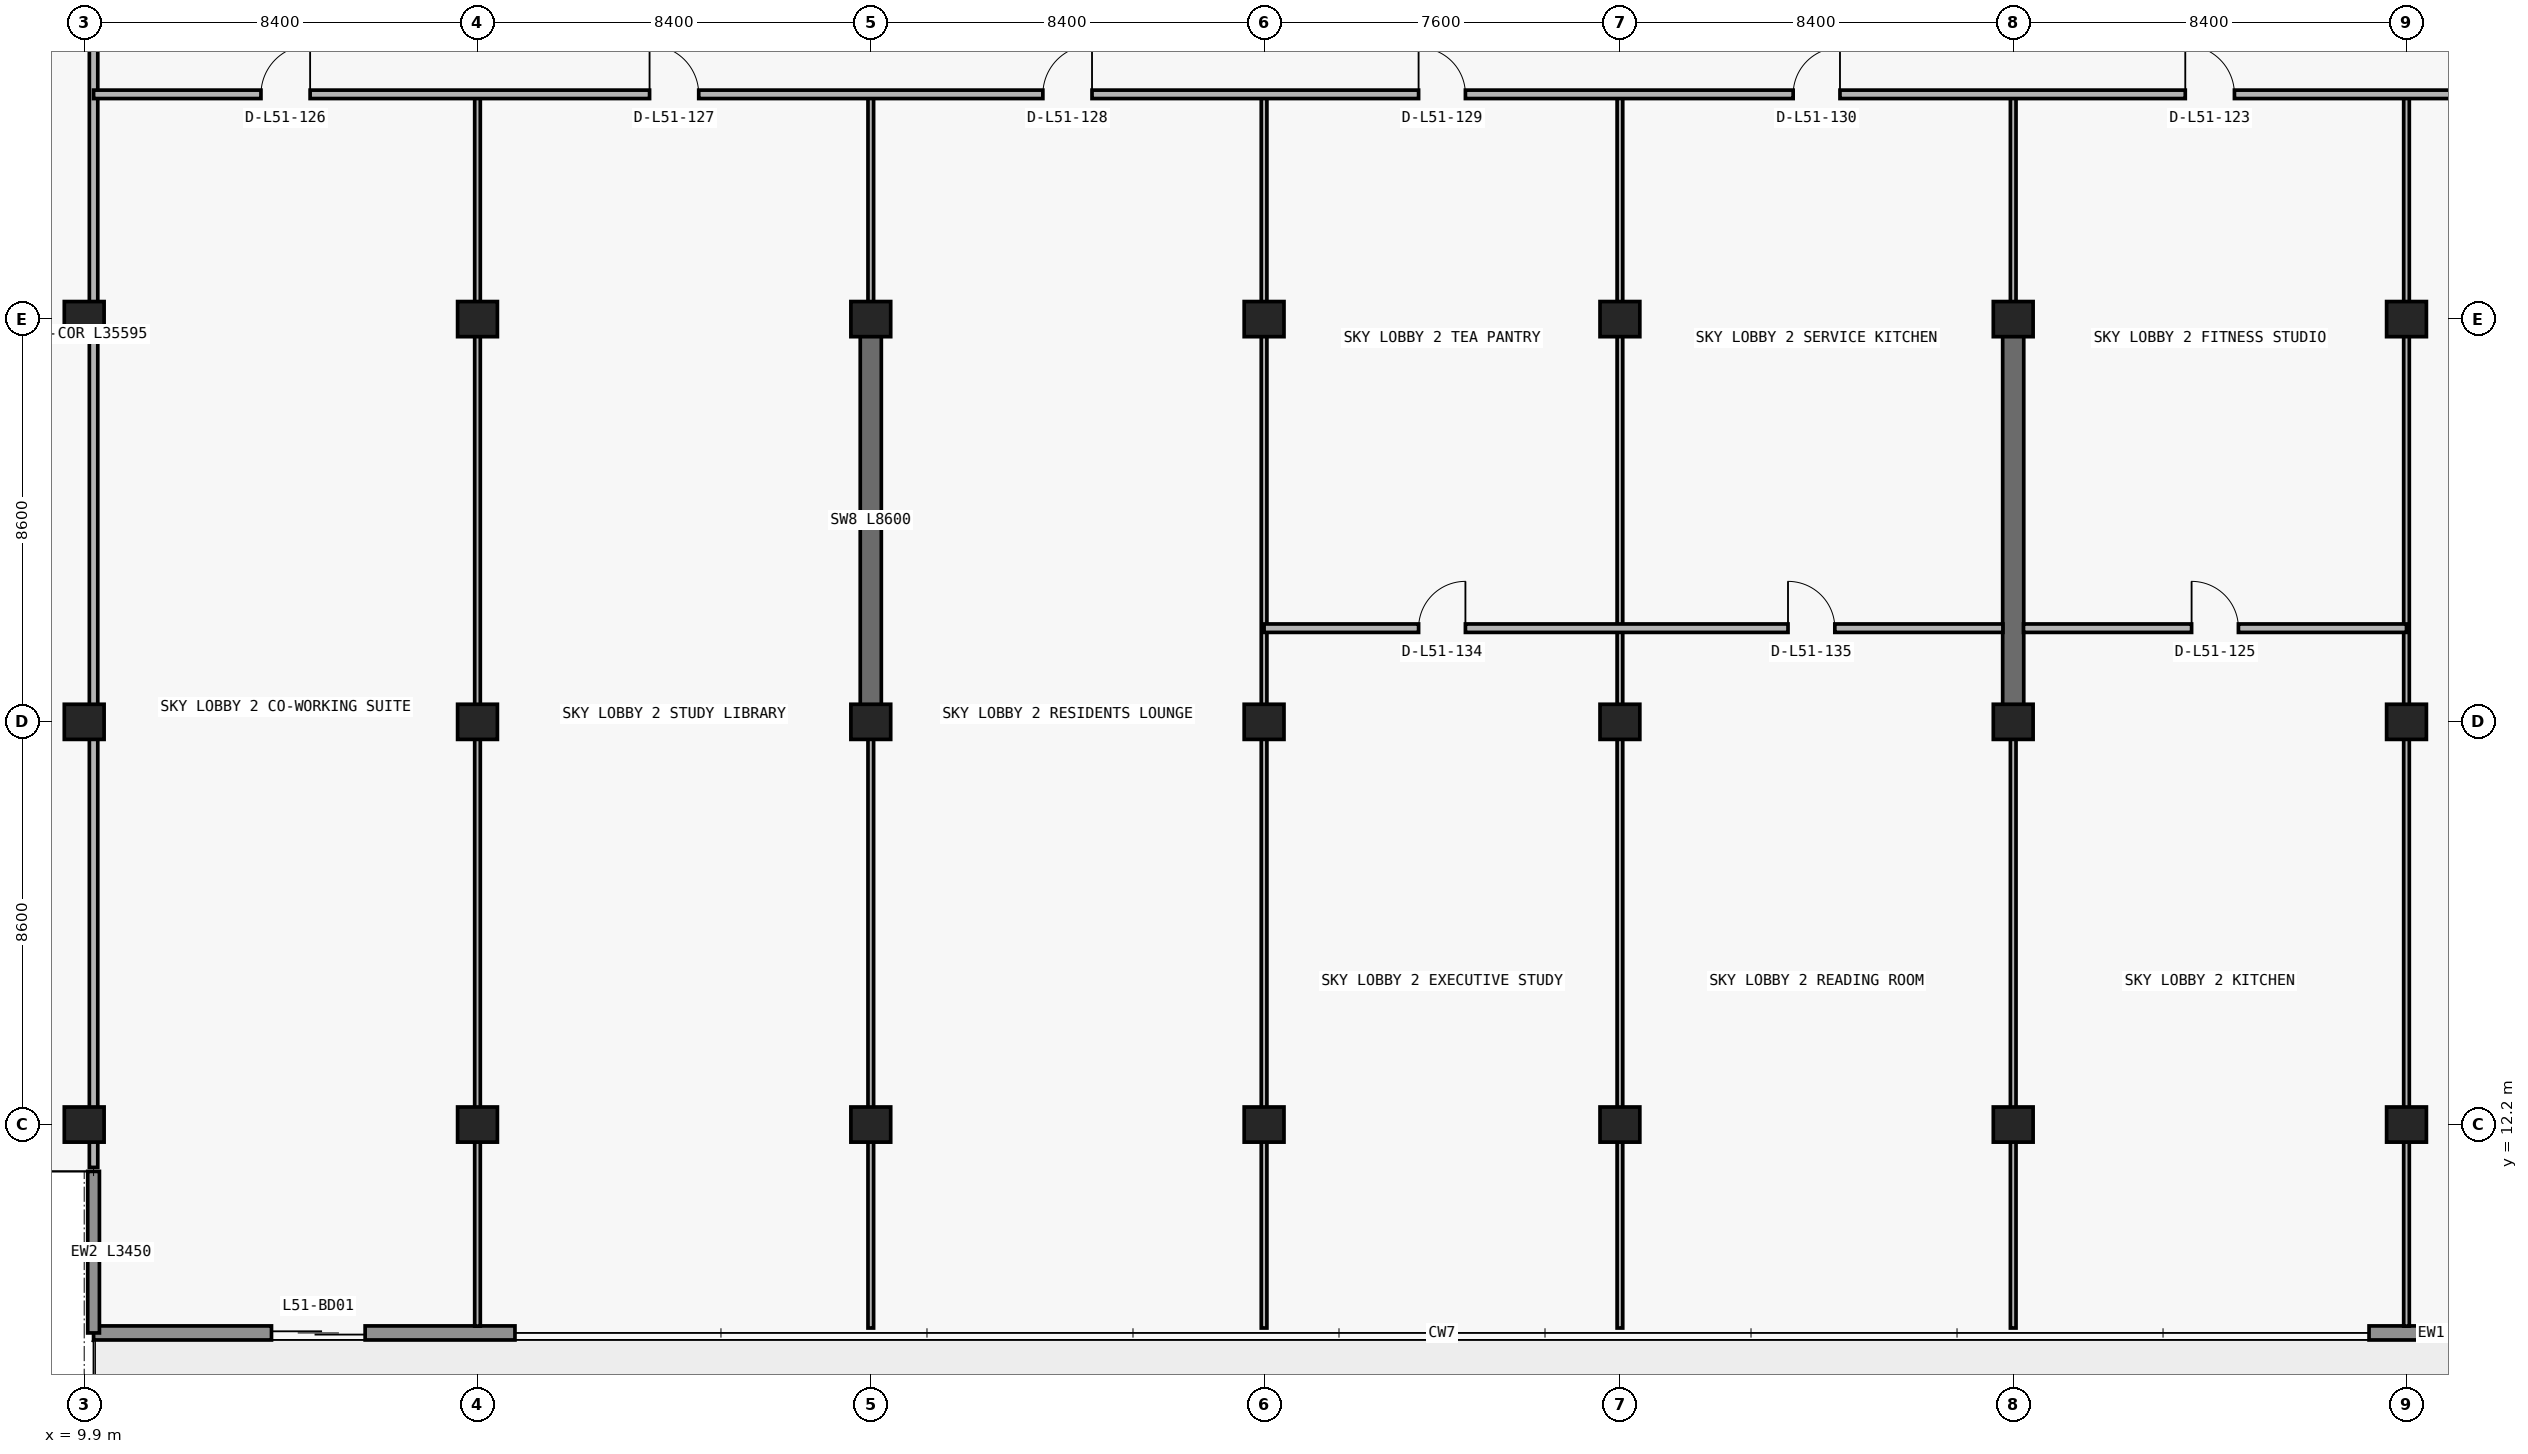
"""IFC4 building model, lengths in metres.
Left out: names, types, materials, properties, quantities, classifications, styles, units other than length and angle.
Written with IfcOpenShell. Run it as: python <this file> out.ifc"""

import sys

from ifc_helpers import new_model, si_unit, direction, frame, frame_2d, origin, origin_2d, place, context, subcontext, project, spatial, rectangle, extrude, element, fill, save


model = new_model("IFC4")
c1 = context("Model", 3, precision=1e-05, world=origin(), true_north=direction((0.0, 1.0)))
c2 = subcontext(c1, "Body", "Model", "MODEL_VIEW")
j1 = project(units=[si_unit("LENGTHUNIT", "METRE"), si_unit("PLANEANGLEUNIT", "RADIAN")], contexts=[c1])
p1 = place(None, origin())
s1 = spatial("IfcSite", under=j1, at=p1, CompositionType="ELEMENT")
p2 = place(p1, origin())
s2 = spatial("IfcBuilding", under=s1, at=p2, CompositionType="ELEMENT")
p3 = place(p2, frame((0.0, 0.0, 183.6)))
s3 = spatial("IfcBuildingStorey", under=s2, at=p3, CompositionType="ELEMENT", Elevation=183.6)
for number, where, z_axis, x_axis in (
    (1, (9.9, 12.2, 0.0), (0.0, 0.0, 1.0), (1.0, 0.0, 0.0)),
    (2, (18.3, 12.2, 0.0), (0.0, 0.0, 1.0), (1.0, 0.0, 0.0)),
    (3, (26.7, 12.2, 0.0), (0.0, 0.0, 1.0), (1.0, 0.0, 0.0)),
    (4, (35.1, 12.2, 0.0), (0.0, 0.0, 1.0), (1.0, 0.0, 0.0)),
    (5, (42.7, 12.2, 0.0), (0.0, 0.0, 1.0), (1.0, 0.0, 0.0)),
    (6, (51.1, 12.2, 0.0), (0.0, 0.0, 1.0), (1.0, 0.0, 0.0)),
    (7, (59.5, 12.2, 0.0), (0.0, 0.0, 1.0), (1.0, 0.0, 0.0)),
    (8, (9.9, 20.8, 0.0), (0.0, 0.0, 1.0), (1.0, 0.0, 0.0)),
    (9, (18.3, 20.8, 0.0), (0.0, 0.0, 1.0), (1.0, 0.0, 0.0)),
    (10, (26.7, 20.8, 0.0), (0.0, 0.0, 1.0), (1.0, 0.0, 0.0)),
    (11, (35.1, 20.8, 0.0), (0.0, 0.0, 1.0), (1.0, 0.0, 0.0)),
    (12, (42.7, 20.8, 0.0), (0.0, 0.0, 1.0), (1.0, 0.0, 0.0)),
    (13, (51.1, 20.8, 0.0), (0.0, 0.0, 1.0), (1.0, 0.0, 0.0)),
    (14, (59.5, 20.8, 0.0), (0.0, 0.0, 1.0), (1.0, 0.0, 0.0)),
    (15, (9.9, 29.4, 0.0), (0.0, 0.0, 1.0), (1.0, 0.0, 0.0)),
    (16, (18.3, 29.4, 0.0), (0.0, 0.0, 1.0), (1.0, 0.0, 0.0)),
    (17, (26.7, 29.4, 0.0), (0.0, 0.0, 1.0), (1.0, 0.0, 0.0)),
    (18, (35.1, 29.4, 0.0), (0.0, 0.0, 1.0), (1.0, 0.0, 0.0)),
    (19, (42.7, 29.4, 0.0), (0.0, 0.0, 1.0), (1.0, 0.0, 0.0)),
    (20, (51.1, 29.4, 0.0), (0.0, 0.0, 1.0), (1.0, 0.0, 0.0)),
    (21, (59.5, 29.4, 0.0), (0.0, 0.0, 1.0), (1.0, 0.0, 0.0)),
):
    element("IfcColumn", number, at=place(p3, frame(where, z_axis=z_axis, x_axis=x_axis)), inside=s3, PredefinedType="COLUMN", context=c2, shape_type="SweptSolid", body=[
        extrude(rectangle(XDim=0.85, YDim=0.75, at=origin_2d()), origin(), (0.0, 0.0, 1.0), 4.55),
    ])
for number, where, z_axis, x_axis in (
    (22, (26.7, 20.8, 0.0), (0.0, 0.0, 1.0), (0.0, 1.0, 0.0)),
    (23, (51.1, 20.8, 0.0), (0.0, 0.0, 1.0), (0.0, 1.0, 0.0)),
):
    element("IfcWall", number, at=place(p3, frame(where, z_axis=z_axis, x_axis=x_axis)), inside=s3, PredefinedType="SHEAR", context=c2, shape_type="SweptSolid", body=[
        extrude(rectangle(XDim=8.6, YDim=0.45, at=frame_2d((4.3, 0.0))), origin(), (0.0, 0.0, 1.0), 4.55),
    ])
p4 = place(p3, frame((67.7, 7.75, 0.0), z_axis=(0.0, 0.0, 1.0), x_axis=(-1.0, 0.0, 0.0)))
e24 = element("IfcWall", 24, at=p4, inside=s3, PredefinedType="STANDARD", context=c2, shape_type="SweptSolid", body=[
    extrude(rectangle(XDim=9.0, YDim=0.3, at=frame_2d((4.5, 0.0))), origin(), (0.0, 0.0, 1.0), 4.55),
])
p5 = place(p4, frame((3.2, 0.0, 0.0)))
e25 = element("IfcOpeningElement", 25, at=p5, cuts=e24, PredefinedType="OPENING", context=c2, shape_type="SweptSolid", body=[
    extrude(rectangle(XDim=2.0, YDim=2.3, at=frame_2d((1.0, 1.15))), frame((0.0, 0.16, 0.0), z_axis=(0.0, -1.0, 0.0), x_axis=(1.0, 0.0, 0.0)), (0.0, 0.0, 1.0), 0.32),
])
p6 = place(p3, frame((19.1, 7.75, 0.0), z_axis=(0.0, 0.0, 1.0), x_axis=(-1.0, 0.0, 0.0)))
e26 = element("IfcWall", 26, at=p6, inside=s3, PredefinedType="STANDARD", context=c2, shape_type="SweptSolid", body=[
    extrude(rectangle(XDim=9.0, YDim=0.3, at=frame_2d((4.5, 0.0))), origin(), (0.0, 0.0, 1.0), 4.55),
])
p7 = place(p6, frame((3.2, 0.0, 0.0)))
e27 = element("IfcOpeningElement", 27, at=p7, cuts=e26, PredefinedType="OPENING", context=c2, shape_type="SweptSolid", body=[
    extrude(rectangle(XDim=2.0, YDim=2.3, at=frame_2d((1.0, 1.15))), frame((0.0, 0.16, 0.0), z_axis=(0.0, -1.0, 0.0), x_axis=(1.0, 0.0, 0.0)), (0.0, 0.0, 1.0), 0.32),
])
p8 = place(p3, frame((10.1, 11.2, 0.0), z_axis=(0.0, 0.0, 1.0), x_axis=(0.0, -1.0, 0.0)))
e28 = element("IfcWall", 28, at=p8, inside=s3, PredefinedType="ELEMENTEDWALL", context=c2, shape_type="SweptSolid", body=[
    extrude(rectangle(XDim=3.45, YDim=0.25, at=frame_2d((1.725, 0.0))), origin(), (0.0, 0.0, 1.0), 4.55),
])
p9 = place(p3, frame((10.1, 11.285, 0.0), z_axis=(0.0, 0.0, 1.0), x_axis=(0.0, 1.0, 0.0)))
e29 = element("IfcWall", 29, at=p9, inside=s3, PredefinedType="PARTITIONING", context=c2, shape_type="SweptSolid", body=[
    extrude(rectangle(XDim=35.595, YDim=0.18, at=frame_2d((17.797, 0.0))), origin(), (0.0, 0.0, 1.0), 3.514),
])
p10 = place(p3, frame((18.3, 7.895, 0.0), z_axis=(0.0, 0.0, 1.0), x_axis=(0.0, 1.0, 0.0)))
e30 = element("IfcWall", 30, at=p10, inside=s3, PredefinedType="PARTITIONING", context=c2, shape_type="SweptSolid", body=[
    extrude(rectangle(XDim=26.305, YDim=0.12, at=frame_2d((13.152, 0.0))), origin(), (0.0, 0.0, 1.0), 3.514),
])
p11 = place(p3, frame((26.7, 7.855, 0.0), z_axis=(0.0, 0.0, 1.0), x_axis=(0.0, 1.0, 0.0)))
e31 = element("IfcWall", 31, at=p11, inside=s3, PredefinedType="PARTITIONING", context=c2, shape_type="SweptSolid", body=[
    extrude(rectangle(XDim=12.94, YDim=0.12, at=frame_2d((6.47, 0.0))), origin(), (0.0, 0.0, 1.0), 3.514),
])
p12 = place(p3, frame((26.7, 29.405, 0.0), z_axis=(0.0, 0.0, 1.0), x_axis=(0.0, 1.0, 0.0)))
e32 = element("IfcWall", 32, at=p12, inside=s3, PredefinedType="PARTITIONING", context=c2, shape_type="SweptSolid", body=[
    extrude(rectangle(XDim=4.795, YDim=0.12, at=frame_2d((2.397, 0.0))), origin(), (0.0, 0.0, 1.0), 3.835),
])
for number, where, z_axis, x_axis in (
    (33, (35.1, 7.855, 0.0), (0.0, 0.0, 1.0), (0.0, 1.0, 0.0)),
    (34, (42.7, 7.855, 0.0), (0.0, 0.0, 1.0), (0.0, 1.0, 0.0)),
):
    element("IfcWall", number, at=place(p3, frame(where, z_axis=z_axis, x_axis=x_axis)), inside=s3, PredefinedType="PARTITIONING", context=c2, shape_type="SweptSolid", body=[
        extrude(rectangle(XDim=26.345, YDim=0.12, at=frame_2d((13.172, 0.0))), origin(), (0.0, 0.0, 1.0), 3.514),
    ])
p13 = place(p3, frame((51.1, 7.855, 0.0), z_axis=(0.0, 0.0, 1.0), x_axis=(0.0, 1.0, 0.0)))
e35 = element("IfcWall", 35, at=p13, inside=s3, PredefinedType="PARTITIONING", context=c2, shape_type="SweptSolid", body=[
    extrude(rectangle(XDim=12.94, YDim=0.12, at=frame_2d((6.47, 0.0))), origin(), (0.0, 0.0, 1.0), 3.514),
])
p14 = place(p3, frame((51.1, 29.405, 0.0), z_axis=(0.0, 0.0, 1.0), x_axis=(0.0, 1.0, 0.0)))
e36 = element("IfcWall", 36, at=p14, inside=s3, PredefinedType="PARTITIONING", context=c2, shape_type="SweptSolid", body=[
    extrude(rectangle(XDim=4.795, YDim=0.12, at=frame_2d((2.397, 0.0))), origin(), (0.0, 0.0, 1.0), 3.835),
])
p15 = place(p3, frame((59.5, 7.895, 0.0), z_axis=(0.0, 0.0, 1.0), x_axis=(0.0, 1.0, 0.0)))
e37 = element("IfcWall", 37, at=p15, inside=s3, PredefinedType="PARTITIONING", context=c2, shape_type="SweptSolid", body=[
    extrude(rectangle(XDim=26.305, YDim=0.12, at=frame_2d((13.152, 0.0))), origin(), (0.0, 0.0, 1.0), 3.514),
])
p16 = place(p3, frame((35.1, 22.8, 0.0), z_axis=(0.0, 0.0, 1.0), x_axis=(1.0, 0.0, 0.0)))
e38 = element("IfcWall", 38, at=p16, inside=s3, PredefinedType="PARTITIONING", context=c2, shape_type="SweptSolid", body=[
    extrude(rectangle(XDim=15.78, YDim=0.18, at=frame_2d((7.89, 0.0))), origin(), (0.0, 0.0, 1.0), 4.55),
])
p17 = place(p16, frame((3.3, 0.0, 0.0)))
e39 = element("IfcOpeningElement", 39, at=p17, cuts=e38, PredefinedType="OPENING", context=c2, shape_type="SweptSolid", body=[
    extrude(rectangle(XDim=1.0, YDim=2.2, at=frame_2d((0.5, 1.1))), frame((0.0, 0.1, 0.0), z_axis=(0.0, -1.0, 0.0), x_axis=(1.0, 0.0, 0.0)), (0.0, 0.0, 1.0), 0.2),
])
p18 = place(p16, frame((11.19, 0.0, 0.0)))
e40 = element("IfcOpeningElement", 40, at=p18, cuts=e38, PredefinedType="OPENING", context=c2, shape_type="SweptSolid", body=[
    extrude(rectangle(XDim=1.0, YDim=2.2, at=frame_2d((0.5, 1.1))), frame((0.0, 0.1, 0.0), z_axis=(0.0, -1.0, 0.0), x_axis=(1.0, 0.0, 0.0)), (0.0, 0.0, 1.0), 0.2),
])
p19 = place(p3, frame((51.32, 22.8, 0.0), z_axis=(0.0, 0.0, 1.0), x_axis=(1.0, 0.0, 0.0)))
e41 = element("IfcWall", 41, at=p19, inside=s3, PredefinedType="PARTITIONING", context=c2, shape_type="SweptSolid", body=[
    extrude(rectangle(XDim=8.18, YDim=0.18, at=frame_2d((4.09, 0.0))), origin(), (0.0, 0.0, 1.0), 4.55),
])
p20 = place(p19, frame((3.59, 0.0, 0.0)))
e42 = element("IfcOpeningElement", 42, at=p20, cuts=e41, PredefinedType="OPENING", context=c2, shape_type="SweptSolid", body=[
    extrude(rectangle(XDim=1.0, YDim=2.2, at=frame_2d((0.5, 1.1))), frame((0.0, 0.1, 0.0), z_axis=(0.0, -1.0, 0.0), x_axis=(1.0, 0.0, 0.0)), (0.0, 0.0, 1.0), 0.2),
])
p21 = place(p3, frame((10.1, 34.2, 0.0), z_axis=(0.0, 0.0, 1.0), x_axis=(1.0, 0.0, 0.0)))
e43 = element("IfcWall", 43, at=p21, inside=s3, PredefinedType="PARTITIONING", context=c2, shape_type="SweptSolid", body=[
    extrude(rectangle(XDim=57.6, YDim=0.18, at=frame_2d((28.8, 0.0))), origin(), (0.0, 0.0, 1.0), 4.55),
])
p22 = place(p21, frame((44.675, 0.0, 0.0)))
e44 = element("IfcOpeningElement", 44, at=p22, cuts=e43, PredefinedType="OPENING", context=c2, shape_type="SweptSolid", body=[
    extrude(rectangle(XDim=1.05, YDim=2.15, at=frame_2d((0.525, 1.075))), frame((0.0, 0.1, 0.0), z_axis=(0.0, -1.0, 0.0), x_axis=(1.0, 0.0, 0.0)), (0.0, 0.0, 1.0), 0.2),
])
p23 = place(p21, frame((52.975, 0.0, 0.0)))
e45 = element("IfcOpeningElement", 45, at=p23, cuts=e43, PredefinedType="OPENING", context=c2, shape_type="SweptSolid", body=[
    extrude(rectangle(XDim=1.05, YDim=2.15, at=frame_2d((0.525, 1.075))), frame((0.0, 0.1, 0.0), z_axis=(0.0, -1.0, 0.0), x_axis=(1.0, 0.0, 0.0)), (0.0, 0.0, 1.0), 0.2),
])
p24 = place(p21, frame((3.575, 0.0, 0.0)))
e46 = element("IfcOpeningElement", 46, at=p24, cuts=e43, PredefinedType="OPENING", context=c2, shape_type="SweptSolid", body=[
    extrude(rectangle(XDim=1.05, YDim=2.15, at=frame_2d((0.525, 1.075))), frame((0.0, 0.1, 0.0), z_axis=(0.0, -1.0, 0.0), x_axis=(1.0, 0.0, 0.0)), (0.0, 0.0, 1.0), 0.2),
])
p25 = place(p21, frame((11.875, 0.0, 0.0)))
e47 = element("IfcOpeningElement", 47, at=p25, cuts=e43, PredefinedType="OPENING", context=c2, shape_type="SweptSolid", body=[
    extrude(rectangle(XDim=1.05, YDim=2.15, at=frame_2d((0.525, 1.075))), frame((0.0, 0.1, 0.0), z_axis=(0.0, -1.0, 0.0), x_axis=(1.0, 0.0, 0.0)), (0.0, 0.0, 1.0), 0.2),
])
p26 = place(p21, frame((20.275, 0.0, 0.0)))
e48 = element("IfcOpeningElement", 48, at=p26, cuts=e43, PredefinedType="OPENING", context=c2, shape_type="SweptSolid", body=[
    extrude(rectangle(XDim=1.05, YDim=2.15, at=frame_2d((0.525, 1.075))), frame((0.0, 0.1, 0.0), z_axis=(0.0, -1.0, 0.0), x_axis=(1.0, 0.0, 0.0)), (0.0, 0.0, 1.0), 0.2),
])
p27 = place(p21, frame((28.3, 0.0, 0.0)))
e49 = element("IfcOpeningElement", 49, at=p27, cuts=e43, PredefinedType="OPENING", context=c2, shape_type="SweptSolid", body=[
    extrude(rectangle(XDim=1.0, YDim=2.2, at=frame_2d((0.5, 1.1))), frame((0.0, 0.1, 0.0), z_axis=(0.0, -1.0, 0.0), x_axis=(1.0, 0.0, 0.0)), (0.0, 0.0, 1.0), 0.2),
])
p28 = place(p21, frame((36.3, 0.0, 0.0)))
e50 = element("IfcOpeningElement", 50, at=p28, cuts=e43, PredefinedType="OPENING", context=c2, shape_type="SweptSolid", body=[
    extrude(rectangle(XDim=1.0, YDim=2.2, at=frame_2d((0.5, 1.1))), frame((0.0, 0.1, 0.0), z_axis=(0.0, -1.0, 0.0), x_axis=(1.0, 0.0, 0.0)), (0.0, 0.0, 1.0), 0.2),
])
p29 = place(p7, origin())
e51 = element("IfcDoor", 51, at=p29, inside=s3, OperationType="DOUBLE_DOOR_SLIDING", PredefinedType="DOOR", context=c2, shape_type="SweptSolid", body=[
    extrude(rectangle(XDim=2.0, YDim=2.3, at=frame_2d((1.0, 1.15))), frame((0.0, 0.025, 0.0), z_axis=(0.0, -1.0, 0.0), x_axis=(1.0, 0.0, 0.0)), (0.0, 0.0, 1.0), 0.05),
])
fill(e27, e51)
p30 = place(p22, origin())
e52 = element("IfcDoor", 52, at=p30, inside=s3, OperationType="SINGLE_SWING_LEFT", PredefinedType="DOOR", context=c2, shape_type="SweptSolid", body=[
    extrude(rectangle(XDim=1.05, YDim=2.15, at=frame_2d((0.525, 1.075))), frame((0.0, 0.025, 0.0), z_axis=(0.0, -1.0, 0.0), x_axis=(1.0, 0.0, 0.0)), (0.0, 0.0, 1.0), 0.05),
])
fill(e44, e52)
p31 = place(p20, origin())
e53 = element("IfcDoor", 53, at=p31, inside=s3, OperationType="SINGLE_SWING_LEFT", PredefinedType="DOOR", context=c2, shape_type="SweptSolid", body=[
    extrude(rectangle(XDim=1.0, YDim=2.2, at=frame_2d((0.5, 1.1))), frame((0.0, 0.025, 0.0), z_axis=(0.0, -1.0, 0.0), x_axis=(1.0, 0.0, 0.0)), (0.0, 0.0, 1.0), 0.05),
])
fill(e42, e53)
p32 = place(p24, origin())
e54 = element("IfcDoor", 54, at=p32, inside=s3, OperationType="SINGLE_SWING_RIGHT", PredefinedType="DOOR", context=c2, shape_type="SweptSolid", body=[
    extrude(rectangle(XDim=1.05, YDim=2.15, at=frame_2d((0.525, 1.075))), frame((0.0, 0.025, 0.0), z_axis=(0.0, -1.0, 0.0), x_axis=(1.0, 0.0, 0.0)), (0.0, 0.0, 1.0), 0.05),
])
fill(e46, e54)
p33 = place(p25, origin())
e55 = element("IfcDoor", 55, at=p33, inside=s3, OperationType="SINGLE_SWING_LEFT", PredefinedType="DOOR", context=c2, shape_type="SweptSolid", body=[
    extrude(rectangle(XDim=1.05, YDim=2.15, at=frame_2d((0.525, 1.075))), frame((0.0, 0.025, 0.0), z_axis=(0.0, -1.0, 0.0), x_axis=(1.0, 0.0, 0.0)), (0.0, 0.0, 1.0), 0.05),
])
fill(e47, e55)
p34 = place(p26, origin())
e56 = element("IfcDoor", 56, at=p34, inside=s3, OperationType="SINGLE_SWING_RIGHT", PredefinedType="DOOR", context=c2, shape_type="SweptSolid", body=[
    extrude(rectangle(XDim=1.05, YDim=2.15, at=frame_2d((0.525, 1.075))), frame((0.0, 0.025, 0.0), z_axis=(0.0, -1.0, 0.0), x_axis=(1.0, 0.0, 0.0)), (0.0, 0.0, 1.0), 0.05),
])
fill(e48, e56)
p35 = place(p27, origin())
e57 = element("IfcDoor", 57, at=p35, inside=s3, OperationType="SINGLE_SWING_LEFT", PredefinedType="DOOR", context=c2, shape_type="SweptSolid", body=[
    extrude(rectangle(XDim=1.0, YDim=2.2, at=frame_2d((0.5, 1.1))), frame((0.0, 0.025, 0.0), z_axis=(0.0, -1.0, 0.0), x_axis=(1.0, 0.0, 0.0)), (0.0, 0.0, 1.0), 0.05),
])
fill(e49, e57)
p36 = place(p28, origin())
e58 = element("IfcDoor", 58, at=p36, inside=s3, OperationType="SINGLE_SWING_RIGHT", PredefinedType="DOOR", context=c2, shape_type="SweptSolid", body=[
    extrude(rectangle(XDim=1.0, YDim=2.2, at=frame_2d((0.5, 1.1))), frame((0.0, 0.025, 0.0), z_axis=(0.0, -1.0, 0.0), x_axis=(1.0, 0.0, 0.0)), (0.0, 0.0, 1.0), 0.05),
])
fill(e50, e58)
p37 = place(p17, origin())
e59 = element("IfcDoor", 59, at=p37, inside=s3, OperationType="SINGLE_SWING_RIGHT", PredefinedType="DOOR", context=c2, shape_type="SweptSolid", body=[
    extrude(rectangle(XDim=1.0, YDim=2.2, at=frame_2d((0.5, 1.1))), frame((0.0, 0.025, 0.0), z_axis=(0.0, -1.0, 0.0), x_axis=(1.0, 0.0, 0.0)), (0.0, 0.0, 1.0), 0.05),
])
fill(e39, e59)
p38 = place(p18, origin())
e60 = element("IfcDoor", 60, at=p38, inside=s3, OperationType="SINGLE_SWING_LEFT", PredefinedType="DOOR", context=c2, shape_type="SweptSolid", body=[
    extrude(rectangle(XDim=1.0, YDim=2.2, at=frame_2d((0.5, 1.1))), frame((0.0, 0.025, 0.0), z_axis=(0.0, -1.0, 0.0), x_axis=(1.0, 0.0, 0.0)), (0.0, 0.0, 1.0), 0.05),
])
fill(e40, e60)
save(model, sys.argv[1])
